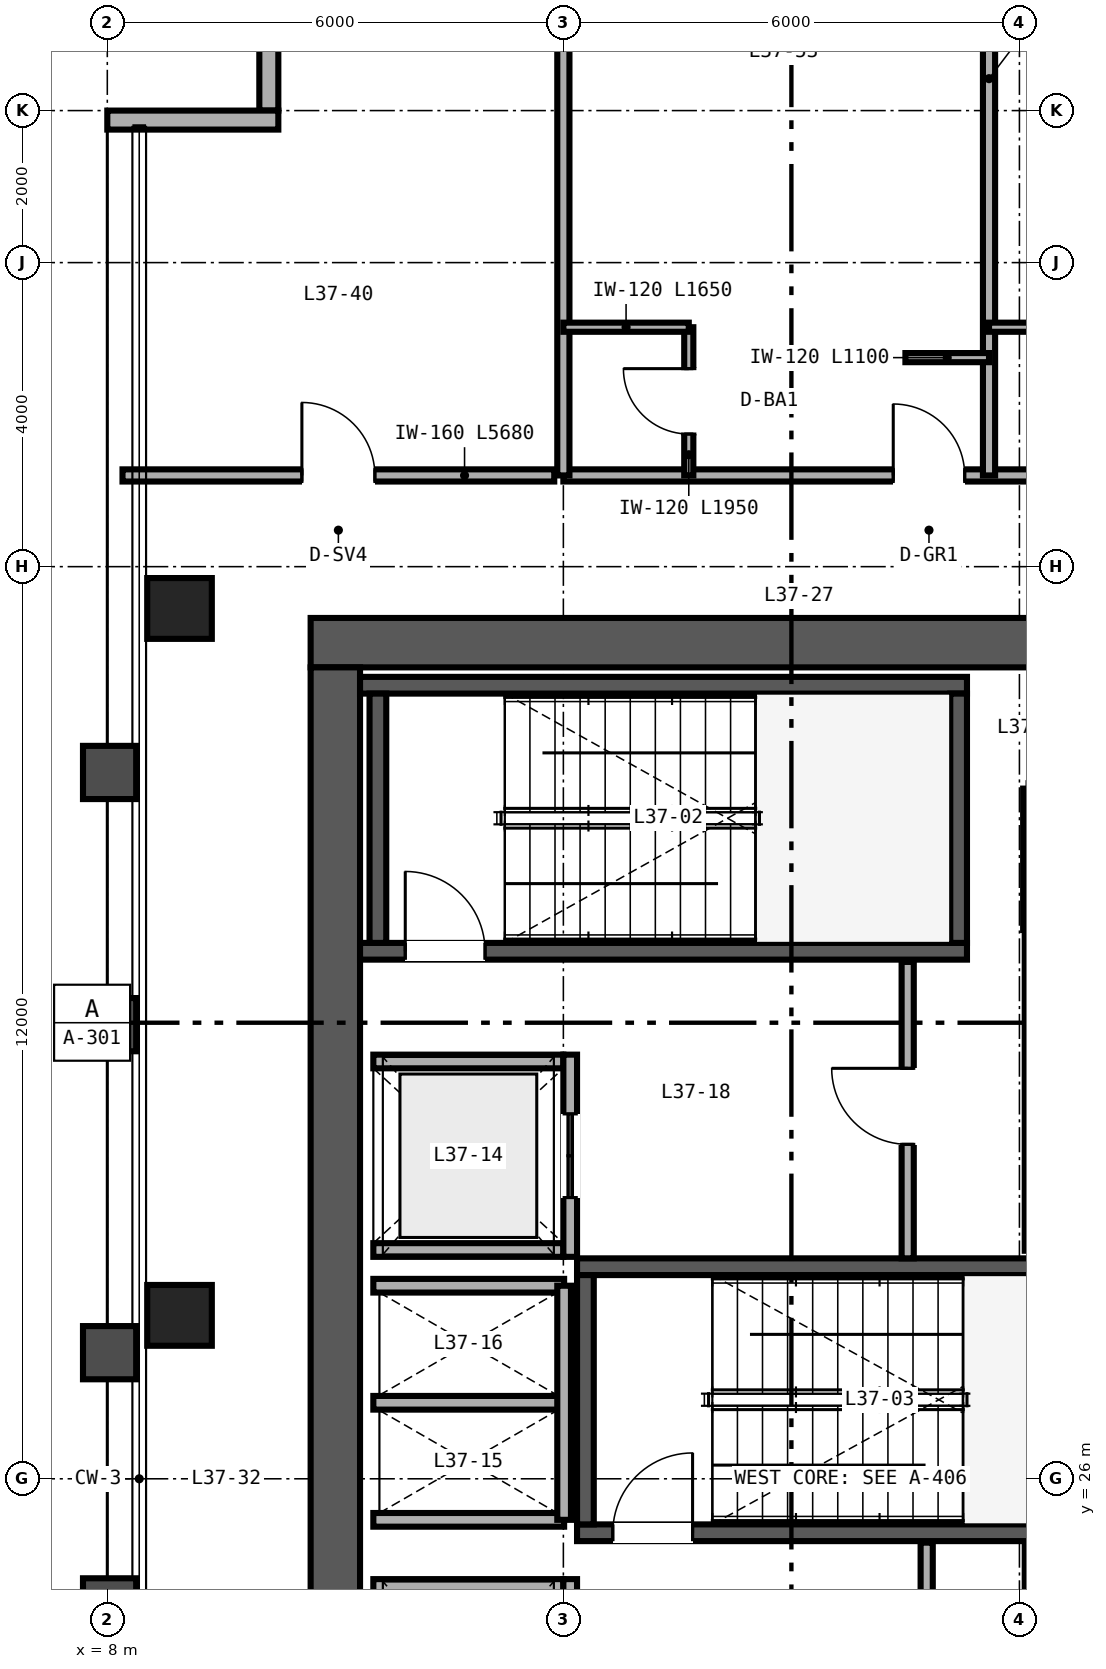
"""IFC4 building model, lengths in metres.
Left out: names, types, materials, properties, quantities, classifications, styles, units other than length and angle.
Written with IfcOpenShell. Run it as: python <this file> out.ifc"""

import sys

from ifc_helpers import new_model, si_unit, direction, frame, frame_2d, origin, origin_2d, place, context, subcontext, project, spatial, rectangle, hollow_rectangle, extrude, source, transform, mapped, element, fill, save


model = new_model("IFC4")
c1 = context("Model", 3, precision=1e-05, world=origin(), true_north=direction((0.0, 1.0)))
c2 = subcontext(c1, "Body", "Model", "MODEL_VIEW")
j1 = project(units=[si_unit("LENGTHUNIT", "METRE"), si_unit("PLANEANGLEUNIT", "RADIAN")], contexts=[c1])
p1 = place(None, origin())
s1 = spatial("IfcSite", under=j1, at=p1, CompositionType="ELEMENT")
p2 = place(p1, origin())
s2 = spatial("IfcBuilding", under=s1, at=p2, CompositionType="ELEMENT")
p3 = place(p2, frame((0.0, 0.0, 147.6)))
s3 = spatial("IfcBuildingStorey", under=s2, at=p3, CompositionType="ELEMENT", Elevation=147.6)
p4 = place(p3, frame((10.675, 37.0, 0.0), z_axis=(0.0, 0.0, 1.0), x_axis=(1.0, 0.0, 0.0)))
e1 = element("IfcWall", 1, at=p4, inside=s3, PredefinedType="SHEAR", context=c2, shape_type="SweptSolid", body=[
    extrude(rectangle(XDim=12.65, YDim=0.65, at=frame_2d((6.325, 0.0))), origin(), (0.0, 0.0, 1.0), 3.28),
])
p5 = place(p4, frame((10.425, 0.0, 0.0)))
e2 = element("IfcOpeningElement", 2, at=p5, cuts=e1, PredefinedType="OPENING", context=c2, shape_type="SweptSolid", body=[
    extrude(rectangle(XDim=1.0, YDim=2.15, at=frame_2d((0.5, 1.075))), frame((0.0, 0.335, 0.0), z_axis=(0.0, -1.0, 0.0), x_axis=(1.0, 0.0, 0.0)), (0.0, 0.0, 1.0), 0.67),
])
p6 = place(p3, frame((11.0, 15.325, 0.0), z_axis=(0.0, 0.0, 1.0), x_axis=(0.0, 1.0, 0.0)))
e3 = element("IfcWall", 3, at=p6, inside=s3, PredefinedType="SHEAR", context=c2, shape_type="SweptSolid", body=[
    extrude(rectangle(XDim=21.35, YDim=0.65, at=frame_2d((10.675, 0.0))), origin(), (0.0, 0.0, 1.0), 3.28),
])
p7 = place(p3, frame((11.325, 32.94, 0.0), z_axis=(0.0, 0.0, 1.0), x_axis=(1.0, 0.0, 0.0)))
e4 = element("IfcWall", 4, at=p7, inside=s3, PredefinedType="SHEAR", context=c2, shape_type="SweptSolid", body=[
    extrude(rectangle(XDim=7.985, YDim=0.22, at=frame_2d((3.993, 0.0))), origin(), (0.0, 0.0, 1.0), 3.4),
])
p8 = place(p7, frame((0.595, 0.0, 0.0)))
e5 = element("IfcOpeningElement", 5, at=p8, cuts=e4, PredefinedType="OPENING", context=c2, shape_type="SweptSolid", body=[
    extrude(rectangle(XDim=1.05, YDim=2.15, at=frame_2d((0.525, 1.075))), frame((0.0, 0.12, 0.0), z_axis=(0.0, -1.0, 0.0), x_axis=(1.0, 0.0, 0.0)), (0.0, 0.0, 1.0), 0.24),
])
p9 = place(p3, frame((11.325, 36.44, 0.0), z_axis=(0.0, 0.0, 1.0), x_axis=(1.0, 0.0, 0.0)))
e6 = element("IfcWall", 6, at=p9, inside=s3, PredefinedType="SHEAR", context=c2, shape_type="SweptSolid", body=[
    extrude(rectangle(XDim=7.985, YDim=0.22, at=frame_2d((3.993, 0.0))), origin(), (0.0, 0.0, 1.0), 3.4),
])
for number, where, z_axis, x_axis in (
    (7, (11.56, 33.05, 0.0), (0.0, 0.0, 1.0), (0.0, 1.0, 0.0)),
    (8, (19.2, 33.05, 0.0), (0.0, 0.0, 1.0), (0.0, 1.0, 0.0)),
):
    element("IfcWall", number, at=place(p3, frame(where, z_axis=z_axis, x_axis=x_axis)), inside=s3, PredefinedType="SHEAR", context=c2, shape_type="SweptSolid", body=[
        extrude(rectangle(XDim=3.28, YDim=0.22, at=frame_2d((1.64, 0.0))), origin(), (0.0, 0.0, 1.0), 3.4),
    ])
p10 = place(p3, frame((14.18, 25.29, 0.0), z_axis=(0.0, 0.0, 1.0), x_axis=(1.0, 0.0, 0.0)))
e9 = element("IfcWall", 9, at=p10, inside=s3, PredefinedType="SHEAR", context=c2, shape_type="SweptSolid", body=[
    extrude(rectangle(XDim=8.495, YDim=0.22, at=frame_2d((4.248, 0.0))), origin(), (0.0, 0.0, 1.0), 3.4),
])
p11 = place(p10, frame((0.47, 0.0, 0.0)))
e10 = element("IfcOpeningElement", 10, at=p11, cuts=e9, PredefinedType="OPENING", context=c2, shape_type="SweptSolid", body=[
    extrude(rectangle(XDim=1.05, YDim=2.15, at=frame_2d((0.525, 1.075))), frame((0.0, 0.12, 0.0), z_axis=(0.0, -1.0, 0.0), x_axis=(1.0, 0.0, 0.0)), (0.0, 0.0, 1.0), 0.24),
])
p12 = place(p3, frame((14.18, 28.79, 0.0), z_axis=(0.0, 0.0, 1.0), x_axis=(1.0, 0.0, 0.0)))
e11 = element("IfcWall", 11, at=p12, inside=s3, PredefinedType="SHEAR", context=c2, shape_type="SweptSolid", body=[
    extrude(rectangle(XDim=8.495, YDim=0.22, at=frame_2d((4.248, 0.0))), origin(), (0.0, 0.0, 1.0), 3.4),
])
p13 = place(p3, frame((14.29, 25.4, 0.0), z_axis=(0.0, 0.0, 1.0), x_axis=(0.0, 1.0, 0.0)))
e12 = element("IfcWall", 12, at=p13, inside=s3, PredefinedType="SHEAR", context=c2, shape_type="SweptSolid", body=[
    extrude(rectangle(XDim=3.28, YDim=0.22, at=frame_2d((1.64, 0.0))), origin(), (0.0, 0.0, 1.0), 3.4),
])
m1 = source(origin(), c2, "Body", "SweptSolid", [
    extrude(hollow_rectangle(XDim=0.85, YDim=0.8, WallThickness=0.032, at=origin_2d()), origin(), (0.0, 0.0, 1.0), 3.28),
])
for number, where, z_axis, x_axis in (
    (13, (8.95, 28.15, 0.0), (0.0, 0.0, 1.0), (1.0, 0.0, 0.0)),
    (14, (8.95, 37.45, 0.0), (0.0, 0.0, 1.0), (1.0, 0.0, 0.0)),
):
    element("IfcColumn", number, at=place(p3, frame(where, z_axis=z_axis, x_axis=x_axis)), inside=s3, PredefinedType="COLUMN", context=c2, shape_type="MappedRepresentation", body=[
        mapped(m1, transform((0.0, 0.0, 0.0), scale=1.0)),
    ])
p14 = place(p3, frame((10.125, 46.0, 0.0), z_axis=(0.0, 0.0, 1.0), x_axis=(0.0, -1.0, 0.0)))
e15 = element("IfcWall", 15, at=p14, inside=s3, PredefinedType="SOLIDWALL", context=c2, shape_type="SweptSolid", body=[
    extrude(rectangle(XDim=2.0, YDim=0.25, at=frame_2d((1.0, 0.0))), origin(), (0.0, 0.0, 1.0), 3.28),
])
p15 = place(p3, frame((10.25, 43.875, 0.0), z_axis=(0.0, 0.0, 1.0), x_axis=(-1.0, 0.0, 0.0)))
e16 = element("IfcWall", 16, at=p15, inside=s3, PredefinedType="SOLIDWALL", context=c2, shape_type="SweptSolid", body=[
    extrude(rectangle(XDim=2.25, YDim=0.25, at=frame_2d((1.125, 0.0))), origin(), (0.0, 0.0, 1.0), 3.28),
])
p16 = place(p3, frame((20.16, 18.82, 0.0), z_axis=(0.0, 0.0, 1.0), x_axis=(0.0, 1.0, 0.0)))
e17 = element("IfcWall", 17, at=p16, inside=s3, PredefinedType="SOLIDWALL", context=c2, shape_type="SweptSolid", body=[
    extrude(rectangle(XDim=6.32, YDim=0.18, at=frame_2d((3.16, 0.0))), origin(), (0.0, 0.0, 1.0), 2.36),
])
p17 = place(p3, frame((20.16, 29.0, 0.0), z_axis=(0.0, 0.0, 1.0), x_axis=(0.0, 1.0, 0.0)))
e18 = element("IfcWall", 18, at=p17, inside=s3, PredefinedType="SOLIDWALL", context=c2, shape_type="SweptSolid", body=[
    extrude(rectangle(XDim=4.29, YDim=0.18, at=frame_2d((2.145, 0.0))), origin(), (0.0, 0.0, 1.0), 3.28),
])
p18 = place(p3, frame((11.5, 24.59, 0.0), z_axis=(0.0, 0.0, 1.0), x_axis=(1.0, 0.0, 0.0)))
e19 = element("IfcWall", 19, at=p18, inside=s3, PredefinedType="SOLIDWALL", context=c2, shape_type="SweptSolid", body=[
    extrude(rectangle(XDim=2.5, YDim=0.18, at=frame_2d((1.25, 0.0))), origin(), (0.0, 0.0, 1.0), 3.28),
])
p19 = place(p3, frame((14.09, 22.02, 0.0), z_axis=(0.0, 0.0, 1.0), x_axis=(0.0, 1.0, 0.0)))
e20 = element("IfcWall", 20, at=p19, inside=s3, PredefinedType="SOLIDWALL", context=c2, shape_type="SweptSolid", body=[
    extrude(rectangle(XDim=2.66, YDim=0.18, at=frame_2d((1.33, 0.0))), origin(), (0.0, 0.0, 1.0), 3.28),
])
p20 = place(p19, frame((0.78, 0.0, 0.0)))
e21 = element("IfcOpeningElement", 21, at=p20, cuts=e20, PredefinedType="OPENING", context=c2, shape_type="SweptSolid", body=[
    extrude(rectangle(XDim=1.1, YDim=2.2, at=frame_2d((0.55, 1.1))), frame((0.0, 0.1, 0.0), z_axis=(0.0, -1.0, 0.0), x_axis=(1.0, 0.0, 0.0)), (0.0, 0.0, 1.0), 0.2),
])
for number, where, z_axis, x_axis in (
    (22, (11.5, 29.01, 0.0), (0.0, 0.0, 1.0), (1.0, 0.0, 0.0)),
    (23, (11.5, 31.49, 0.0), (0.0, 0.0, 1.0), (1.0, 0.0, 0.0)),
):
    element("IfcWall", number, at=place(p3, frame(where, z_axis=z_axis, x_axis=x_axis)), inside=s3, PredefinedType="SOLIDWALL", context=c2, shape_type="SweptSolid", body=[
        extrude(rectangle(XDim=2.5, YDim=0.18, at=frame_2d((1.25, 0.0))), origin(), (0.0, 0.0, 1.0), 3.28),
    ])
p21 = place(p3, frame((14.09, 28.92, 0.0), z_axis=(0.0, 0.0, 1.0), x_axis=(0.0, 1.0, 0.0)))
e24 = element("IfcWall", 24, at=p21, inside=s3, PredefinedType="SOLIDWALL", context=c2, shape_type="SweptSolid", body=[
    extrude(rectangle(XDim=2.66, YDim=0.18, at=frame_2d((1.33, 0.0))), origin(), (0.0, 0.0, 1.0), 3.28),
])
p22 = place(p21, frame((0.78, 0.0, 0.0)))
e25 = element("IfcOpeningElement", 25, at=p22, cuts=e24, PredefinedType="OPENING", context=c2, shape_type="SweptSolid", body=[
    extrude(rectangle(XDim=1.1, YDim=2.2, at=frame_2d((0.55, 1.1))), frame((0.0, 0.1, 0.0), z_axis=(0.0, -1.0, 0.0), x_axis=(1.0, 0.0, 0.0)), (0.0, 0.0, 1.0), 0.2),
])
for number, where, z_axis, x_axis in (
    (26, (11.5, 25.46, 0.0), (0.0, 0.0, 1.0), (1.0, 0.0, 0.0)),
    (27, (11.5, 27.0, 0.0), (0.0, 0.0, 1.0), (1.0, 0.0, 0.0)),
    (28, (11.5, 28.54, 0.0), (0.0, 0.0, 1.0), (1.0, 0.0, 0.0)),
):
    element("IfcWall", number, at=place(p3, frame(where, z_axis=z_axis, x_axis=x_axis)), inside=s3, PredefinedType="SOLIDWALL", context=c2, shape_type="SweptSolid", body=[
        extrude(rectangle(XDim=2.51, YDim=0.18, at=frame_2d((1.255, 0.0))), origin(), (0.0, 0.0, 1.0), 3.28),
    ])
p23 = place(p3, frame((14.01, 25.46, 0.0), z_axis=(0.0, 0.0, 1.0), x_axis=(0.0, 1.0, 0.0)))
e29 = element("IfcWall", 29, at=p23, inside=s3, PredefinedType="SOLIDWALL", context=c2, shape_type="SweptSolid", body=[
    extrude(rectangle(XDim=3.08, YDim=0.18, at=frame_2d((1.54, 0.0))), origin(), (0.0, 0.0, 1.0), 3.28),
])
p24 = place(p3, frame((18.78, 21.35, 0.0), z_axis=(0.0, 0.0, 1.0), x_axis=(0.0, 1.0, 0.0)))
e30 = element("IfcWall", 30, at=p24, inside=s3, PredefinedType="PARTITIONING", context=c2, shape_type="SweptSolid", body=[
    extrude(rectangle(XDim=3.81, YDim=0.16, at=frame_2d((1.905, 0.0))), origin(), (0.0, 0.0, 1.0), 3.28),
])
p25 = place(p3, frame((18.53, 28.9, 0.0), z_axis=(0.0, 0.0, 1.0), x_axis=(0.0, 1.0, 0.0)))
e31 = element("IfcWall", 31, at=p25, inside=s3, PredefinedType="PARTITIONING", context=c2, shape_type="SweptSolid", body=[
    extrude(rectangle(XDim=3.9, YDim=0.16, at=frame_2d((1.95, 0.0))), origin(), (0.0, 0.0, 1.0), 3.28),
])
p26 = place(p25, frame((1.5, 0.0, 0.0)))
e32 = element("IfcOpeningElement", 32, at=p26, cuts=e31, PredefinedType="OPENING", context=c2, shape_type="SweptSolid", body=[
    extrude(rectangle(XDim=1.0, YDim=2.15, at=frame_2d((0.5, 1.075))), frame((0.0, 0.09, 0.0), z_axis=(0.0, -1.0, 0.0), x_axis=(1.0, 0.0, 0.0)), (0.0, 0.0, 1.0), 0.18),
])
p27 = place(p3, frame((20.12, 33.22, 0.0), z_axis=(0.0, 0.0, 1.0), x_axis=(0.0, 1.0, 0.0)))
e33 = element("IfcWall", 33, at=p27, inside=s3, PredefinedType="PARTITIONING", context=c2, shape_type="SweptSolid", body=[
    extrude(rectangle(XDim=1.86, YDim=0.142, at=frame_2d((0.93, 0.0))), origin(), (0.0, 0.0, 1.0), 3.28),
])
p28 = place(p3, frame((8.2, 39.2, 0.0), z_axis=(0.0, 0.0, 1.0), x_axis=(1.0, 0.0, 0.0)))
e34 = element("IfcWall", 34, at=p28, inside=s3, PredefinedType="PARTITIONING", context=c2, shape_type="SweptSolid", body=[
    extrude(rectangle(XDim=5.68, YDim=0.16, at=frame_2d((2.84, 0.0))), origin(), (0.0, 0.0, 1.0), 3.28),
])
p29 = place(p28, frame((2.36, 0.0, 0.0)))
e35 = element("IfcOpeningElement", 35, at=p29, cuts=e34, PredefinedType="OPENING", context=c2, shape_type="SweptSolid", body=[
    extrude(rectangle(XDim=0.96, YDim=2.15, at=frame_2d((0.48, 1.075))), frame((0.0, 0.09, 0.0), z_axis=(0.0, -1.0, 0.0), x_axis=(1.0, 0.0, 0.0)), (0.0, 0.0, 1.0), 0.18),
])
p30 = place(p3, frame((14.0, 39.2, 0.0), z_axis=(0.0, 0.0, 1.0), x_axis=(1.0, 0.0, 0.0)))
e36 = element("IfcWall", 36, at=p30, inside=s3, PredefinedType="PARTITIONING", context=c2, shape_type="SweptSolid", body=[
    extrude(rectangle(XDim=36.0, YDim=0.16, at=frame_2d((18.0, 0.0))), origin(), (0.0, 0.0, 1.0), 2.501),
])
p31 = place(p30, frame((4.34, 0.0, 0.0)))
e37 = element("IfcOpeningElement", 37, at=p31, cuts=e36, PredefinedType="OPENING", context=c2, shape_type="SweptSolid", body=[
    extrude(rectangle(XDim=0.94, YDim=2.15, at=frame_2d((0.47, 1.075))), frame((0.0, 0.09, 0.0), z_axis=(0.0, -1.0, 0.0), x_axis=(1.0, 0.0, 0.0)), (0.0, 0.0, 1.0), 0.18),
])
p32 = place(p30, frame((9.94, 0.0, 0.0)))
e38 = element("IfcOpeningElement", 38, at=p32, cuts=e36, PredefinedType="OPENING", context=c2, shape_type="SweptSolid", body=[
    extrude(rectangle(XDim=0.94, YDim=2.15, at=frame_2d((0.47, 1.075))), frame((0.0, 0.09, 0.0), z_axis=(0.0, -1.0, 0.0), x_axis=(1.0, 0.0, 0.0)), (0.0, 0.0, 1.0), 0.18),
])
p33 = place(p30, frame((17.3, 0.0, 0.0)))
e39 = element("IfcOpeningElement", 39, at=p33, cuts=e36, PredefinedType="OPENING", context=c2, shape_type="SweptSolid", body=[
    extrude(rectangle(XDim=0.98, YDim=2.2, at=frame_2d((0.49, 1.1))), frame((0.0, 0.09, 0.0), z_axis=(0.0, -1.0, 0.0), x_axis=(1.0, 0.0, 0.0)), (0.0, 0.0, 1.0), 0.18),
])
p34 = place(p30, frame((24.7, 0.0, 0.0)))
e40 = element("IfcOpeningElement", 40, at=p34, cuts=e36, PredefinedType="OPENING", context=c2, shape_type="SweptSolid", body=[
    extrude(rectangle(XDim=0.98, YDim=2.2, at=frame_2d((0.49, 1.1))), frame((0.0, 0.09, 0.0), z_axis=(0.0, -1.0, 0.0), x_axis=(1.0, 0.0, 0.0)), (0.0, 0.0, 1.0), 0.18),
])
p35 = place(p30, frame((28.12, 0.0, 0.0)))
e41 = element("IfcOpeningElement", 41, at=p35, cuts=e36, PredefinedType="OPENING", context=c2, shape_type="SweptSolid", body=[
    extrude(rectangle(XDim=0.96, YDim=2.15, at=frame_2d((0.48, 1.075))), frame((0.0, 0.09, 0.0), z_axis=(0.0, -1.0, 0.0), x_axis=(1.0, 0.0, 0.0)), (0.0, 0.0, 1.0), 0.18),
])
p36 = place(p30, frame((34.74, 0.0, 0.0)))
e42 = element("IfcOpeningElement", 42, at=p36, cuts=e36, PredefinedType="OPENING", context=c2, shape_type="SweptSolid", body=[
    extrude(rectangle(XDim=0.94, YDim=2.15, at=frame_2d((0.47, 1.075))), frame((0.0, 0.09, 0.0), z_axis=(0.0, -1.0, 0.0), x_axis=(1.0, 0.0, 0.0)), (0.0, 0.0, 1.0), 0.18),
])
for number, where, z_axis, x_axis in (
    (43, (14.0, 39.2, 0.0), (0.0, 0.0, 1.0), (0.0, 1.0, 0.0)),
    (44, (19.6, 39.2, 0.0), (0.0, 0.0, 1.0), (0.0, 1.0, 0.0)),
):
    element("IfcWall", number, at=place(p3, frame(where, z_axis=z_axis, x_axis=x_axis)), inside=s3, PredefinedType="PARTITIONING", context=c2, shape_type="SweptSolid", body=[
        extrude(rectangle(XDim=10.44, YDim=0.16, at=frame_2d((5.22, 0.0))), origin(), (0.0, 0.0, 1.0), 2.587),
    ])
p37 = place(p3, frame((15.65, 39.2, 0.0), z_axis=(0.0, 0.0, 1.0), x_axis=(0.0, 1.0, 0.0)))
e45 = element("IfcWall", 45, at=p37, inside=s3, PredefinedType="PARTITIONING", context=c2, shape_type="SweptSolid", body=[
    extrude(rectangle(XDim=1.95, YDim=0.12, at=frame_2d((0.975, 0.0))), origin(), (0.0, 0.0, 1.0), 3.28),
])
p38 = place(p37, frame((0.545, 0.0, 0.0)))
e46 = element("IfcOpeningElement", 46, at=p38, cuts=e45, PredefinedType="OPENING", context=c2, shape_type="SweptSolid", body=[
    extrude(rectangle(XDim=0.86, YDim=2.1, at=frame_2d((0.43, 1.05))), frame((0.0, 0.07, 0.0), z_axis=(0.0, -1.0, 0.0), x_axis=(1.0, 0.0, 0.0)), (0.0, 0.0, 1.0), 0.14),
])
p39 = place(p3, frame((14.0, 41.15, 0.0), z_axis=(0.0, 0.0, 1.0), x_axis=(1.0, 0.0, 0.0)))
e47 = element("IfcWall", 47, at=p39, inside=s3, PredefinedType="PARTITIONING", context=c2, shape_type="SweptSolid", body=[
    extrude(rectangle(XDim=1.65, YDim=0.12, at=frame_2d((0.825, 0.0))), origin(), (0.0, 0.0, 1.0), 3.28),
])
p40 = place(p3, frame((18.5, 40.75, 0.0), z_axis=(0.0, 0.0, 1.0), x_axis=(1.0, 0.0, 0.0)))
e48 = element("IfcWall", 48, at=p40, inside=s3, PredefinedType="PARTITIONING", context=c2, shape_type="SweptSolid", body=[
    extrude(rectangle(XDim=1.1, YDim=0.12, at=frame_2d((0.55, 0.0))), origin(), (0.0, 0.0, 1.0), 3.28),
])
p41 = place(p3, frame((19.6, 41.15, 0.0), z_axis=(0.0, 0.0, 1.0), x_axis=(1.0, 0.0, 0.0)))
e49 = element("IfcWall", 49, at=p41, inside=s3, PredefinedType="PARTITIONING", context=c2, shape_type="SweptSolid", body=[
    extrude(rectangle(XDim=1.65, YDim=0.12, at=frame_2d((0.825, 0.0))), origin(), (0.0, 0.0, 1.0), 3.28),
])
m2 = source(origin(), c2, "Body", "SweptSolid", [
    extrude(rectangle(XDim=1.05, YDim=2.15, at=frame_2d((0.525, 1.075))), frame((0.0, 0.025, 0.0), z_axis=(0.0, -1.0, 0.0), x_axis=(1.0, 0.0, 0.0)), (0.0, 0.0, 1.0), 0.05),
])
p42 = place(p8, origin())
e50 = element("IfcDoor", 50, at=p42, inside=s3, OperationType="SINGLE_SWING_LEFT", PredefinedType="DOOR", context=c2, shape_type="MappedRepresentation", body=[
    mapped(m2, transform((0.0, 0.0, 0.0), scale=1.0)),
])
fill(e5, e50)
p43 = place(p11, origin())
e51 = element("IfcDoor", 51, at=p43, inside=s3, OperationType="SINGLE_SWING_RIGHT", PredefinedType="DOOR", context=c2, shape_type="MappedRepresentation", body=[
    mapped(m2, transform((0.0, 0.0, 0.0), scale=1.0)),
])
fill(e10, e51)
m3 = source(origin(), c2, "Body", "SweptSolid", [
    extrude(rectangle(XDim=1.1, YDim=2.2, at=frame_2d((0.55, 1.1))), frame((0.0, 0.025, 0.0), z_axis=(0.0, -1.0, 0.0), x_axis=(1.0, 0.0, 0.0)), (0.0, 0.0, 1.0), 0.05),
])
p44 = place(p22, origin())
e52 = element("IfcDoor", 52, at=p44, inside=s3, OperationType="DOUBLE_DOOR_SLIDING", PredefinedType="DOOR", context=c2, shape_type="MappedRepresentation", body=[
    mapped(m3, transform((0.0, 0.0, 0.0), scale=1.0)),
])
fill(e25, e52)
m4 = source(origin(), c2, "Body", "SweptSolid", [
    extrude(rectangle(XDim=1.0, YDim=2.15, at=frame_2d((0.5, 1.075))), frame((0.0, 0.025, 0.0), z_axis=(0.0, -1.0, 0.0), x_axis=(1.0, 0.0, 0.0)), (0.0, 0.0, 1.0), 0.05),
])
p45 = place(p26, origin())
e53 = element("IfcDoor", 53, at=p45, inside=s3, OperationType="SINGLE_SWING_RIGHT", PredefinedType="DOOR", context=c2, shape_type="MappedRepresentation", body=[
    mapped(m4, transform((0.0, 0.0, 0.0), scale=1.0)),
])
fill(e32, e53)
m5 = source(origin(), c2, "Body", "SweptSolid", [
    extrude(rectangle(XDim=0.96, YDim=2.15, at=frame_2d((0.48, 1.075))), frame((0.0, 0.025, 0.0), z_axis=(0.0, -1.0, 0.0), x_axis=(1.0, 0.0, 0.0)), (0.0, 0.0, 1.0), 0.05),
])
p46 = place(p29, origin())
e54 = element("IfcDoor", 54, at=p46, inside=s3, OperationType="SINGLE_SWING_LEFT", PredefinedType="DOOR", context=c2, shape_type="MappedRepresentation", body=[
    mapped(m5, transform((0.0, 0.0, 0.0), scale=1.0)),
])
fill(e35, e54)
m6 = source(origin(), c2, "Body", "SweptSolid", [
    extrude(rectangle(XDim=0.86, YDim=2.1, at=frame_2d((0.43, 1.05))), frame((0.0, 0.025, 0.0), z_axis=(0.0, -1.0, 0.0), x_axis=(1.0, 0.0, 0.0)), (0.0, 0.0, 1.0), 0.05),
])
p47 = place(p38, origin())
e55 = element("IfcDoor", 55, at=p47, inside=s3, OperationType="SINGLE_SWING_RIGHT", PredefinedType="DOOR", context=c2, shape_type="MappedRepresentation", body=[
    mapped(m6, transform((0.0, 0.0, 0.0), scale=1.0)),
])
fill(e46, e55)
m7 = source(origin(), c2, "Body", "SweptSolid", [
    extrude(rectangle(XDim=0.94, YDim=2.15, at=frame_2d((0.47, 1.075))), frame((0.0, 0.025, 0.0), z_axis=(0.0, -1.0, 0.0), x_axis=(1.0, 0.0, 0.0)), (0.0, 0.0, 1.0), 0.05),
])
p48 = place(p31, origin())
e56 = element("IfcDoor", 56, at=p48, inside=s3, OperationType="SINGLE_SWING_LEFT", PredefinedType="DOOR", context=c2, shape_type="MappedRepresentation", body=[
    mapped(m7, transform((0.0, 0.0, 0.0), scale=1.0)),
])
fill(e37, e56)
save(model, sys.argv[1])
